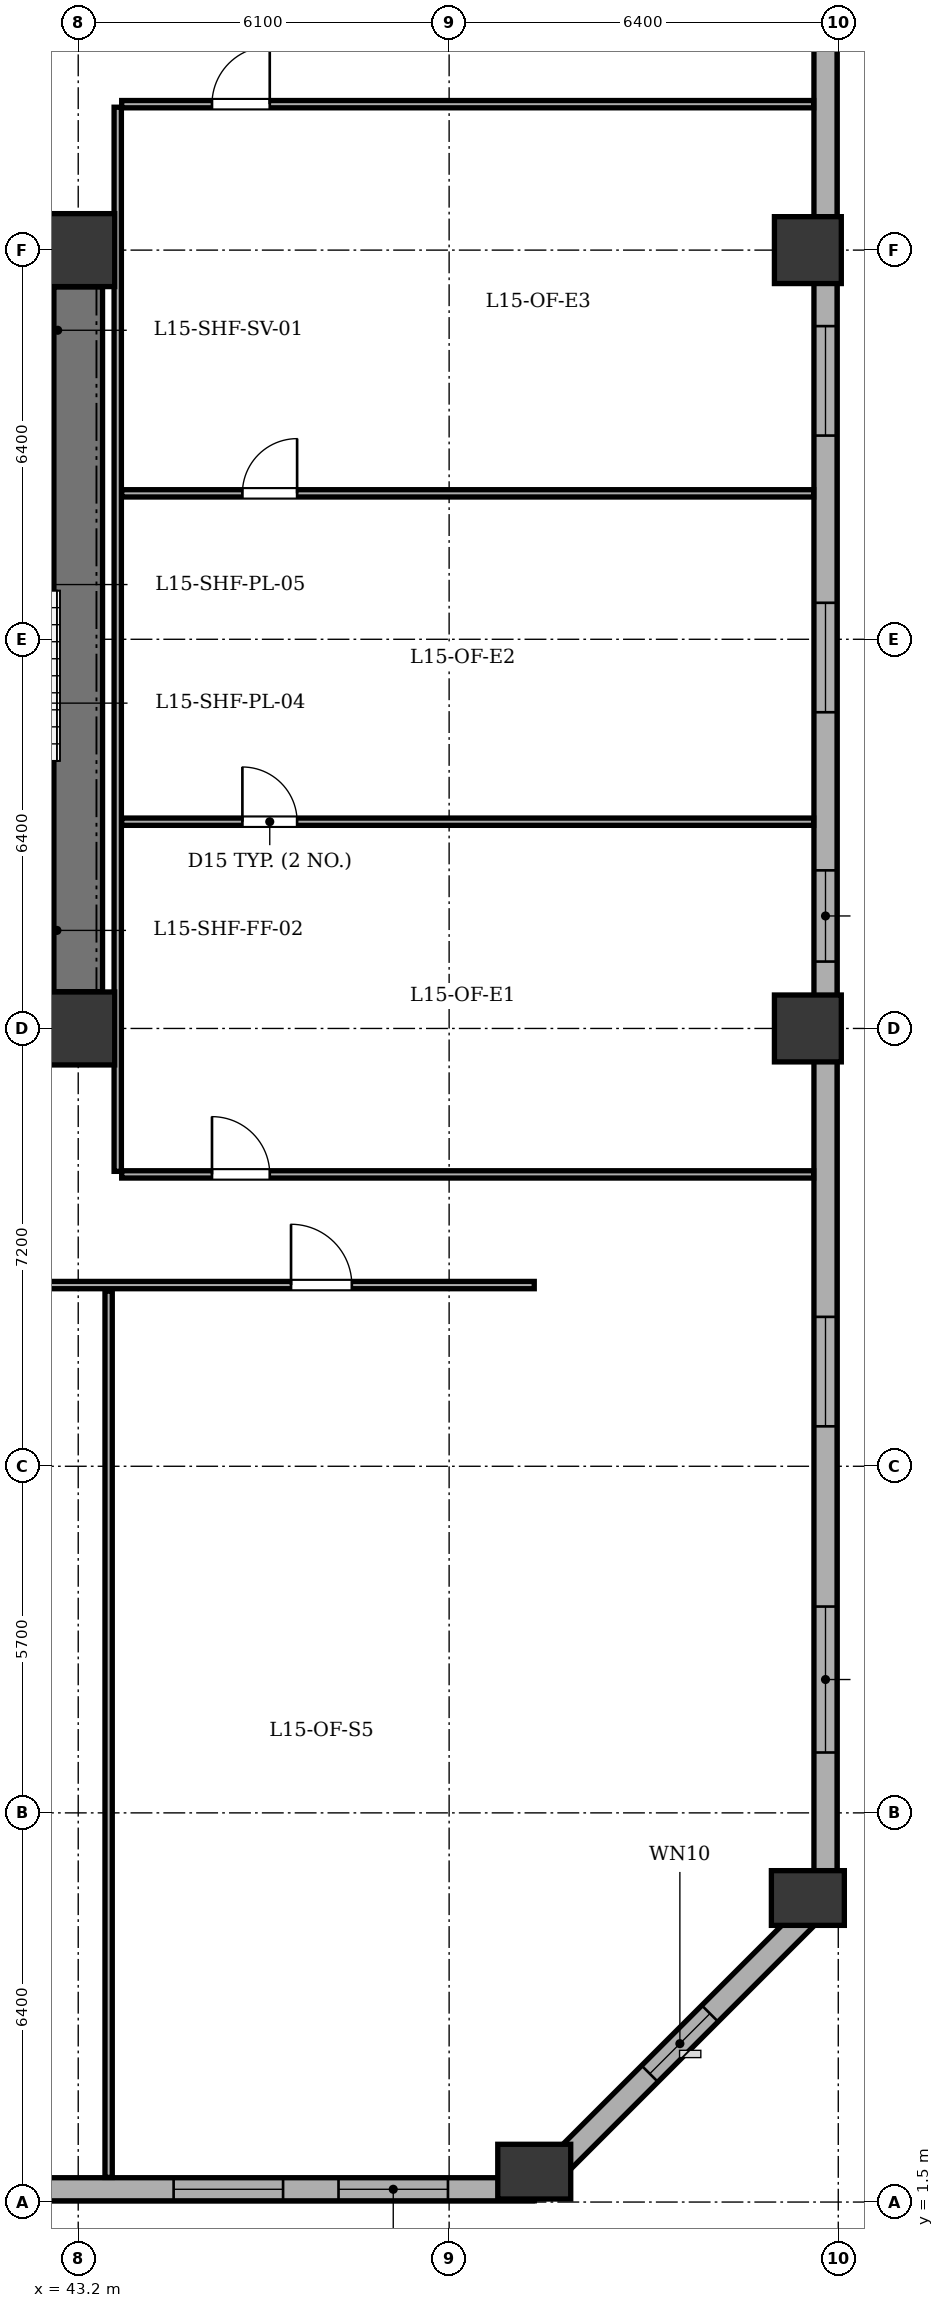
"""IFC4 building model, lengths in metres.
Left out: names, types, materials, properties, quantities, classifications, styles, units other than length and angle.
Written with IfcOpenShell. Run it as: python <this file> out.ifc"""

import sys

from ifc_helpers import new_model, si_unit, direction, frame, frame_2d, origin, origin_2d, place, context, subcontext, project, spatial, rectangle, extrude, element, fill, save


model = new_model("IFC4")
c1 = context("Model", 3, precision=1e-05, world=origin(), true_north=direction((0.0, 1.0)))
c2 = subcontext(c1, "Body", "Model", "MODEL_VIEW")
j1 = project(units=[si_unit("LENGTHUNIT", "METRE"), si_unit("PLANEANGLEUNIT", "RADIAN")], contexts=[c1])
p1 = place(None, origin())
s1 = spatial("IfcSite", under=j1, at=p1, CompositionType="ELEMENT")
p2 = place(p1, origin())
s2 = spatial("IfcBuilding", under=s1, at=p2, CompositionType="ELEMENT")
p3 = place(p2, frame((0.0, 0.0, 63.3)))
s3 = spatial("IfcBuildingStorey", under=s2, at=p3, CompositionType="ELEMENT", Elevation=63.3)
for number, where, z_axis, x_axis in (
    (1, (43.2, 20.8, 0.0), (0.0, 0.0, 1.0), (1.0, 0.0, 0.0)),
    (2, (43.2, 33.6, 0.0), (0.0, 0.0, 1.0), (1.0, 0.0, 0.0)),
):
    element("IfcColumn", number, at=place(p3, frame(where, z_axis=z_axis, x_axis=x_axis)), inside=s3, PredefinedType="COLUMN", context=c2, shape_type="SweptSolid", body=[
        extrude(rectangle(XDim=1.2, YDim=1.2, at=origin_2d()), origin(), (0.0, 0.0, 1.0), 3.9),
    ])
for number, where, z_axis, x_axis in (
    (3, (50.7, 2.0, 0.0), (0.0, 0.0, 1.0), (1.0, 0.0, 0.0)),
    (4, (55.2, 6.5, 0.0), (0.0, 0.0, 1.0), (1.0, 0.0, 0.0)),
):
    element("IfcColumn", number, at=place(p3, frame(where, z_axis=z_axis, x_axis=x_axis)), inside=s3, PredefinedType="COLUMN", context=c2, shape_type="SweptSolid", body=[
        extrude(rectangle(XDim=0.9, YDim=1.2, at=origin_2d()), origin(), (0.0, 0.0, 1.0), 3.9),
    ])
for number, where, z_axis, x_axis in (
    (5, (55.2, 20.8, 0.0), (0.0, 0.0, 1.0), (1.0, 0.0, 0.0)),
    (6, (55.2, 33.6, 0.0), (0.0, 0.0, 1.0), (1.0, 0.0, 0.0)),
):
    element("IfcColumn", number, at=place(p3, frame(where, z_axis=z_axis, x_axis=x_axis)), inside=s3, PredefinedType="COLUMN", context=c2, shape_type="SweptSolid", body=[
        extrude(rectangle(XDim=1.1, YDim=1.1, at=origin_2d()), origin(), (0.0, 0.0, 1.0), 3.9),
    ])
p4 = place(p3, frame((50.7, 1.71, 0.0), z_axis=(0.0, 0.0, 1.0), x_axis=(-1.0, 0.0, 0.0)))
e7 = element("IfcWall", 7, at=p4, inside=s3, PredefinedType="STANDARD", context=c2, shape_type="SweptSolid", body=[
    extrude(rectangle(XDim=35.0, YDim=0.38, at=frame_2d((17.5, 0.0))), origin(), (0.0, 0.0, 1.0), 3.135),
])
p5 = place(p4, frame((26.0, 0.0, 0.0)))
e8 = element("IfcOpeningElement", 8, at=p5, cuts=e7, PredefinedType="OPENING", context=c2, shape_type="SweptSolid", body=[
    extrude(rectangle(XDim=1.0, YDim=2.02, at=frame_2d((0.5, 1.01))), frame((0.0, 0.2, 0.0), z_axis=(0.0, -1.0, 0.0), x_axis=(1.0, 0.0, 0.0)), (0.0, 0.0, 1.0), 0.4),
])
p6 = place(p4, frame((1.419, 0.0, 0.8)))
e9 = element("IfcOpeningElement", 9, at=p6, cuts=e7, PredefinedType="OPENING", context=c2, shape_type="SweptSolid", body=[
    extrude(rectangle(XDim=1.8, YDim=1.9, at=frame_2d((0.9, 0.95))), frame((0.0, 0.2, 0.0), z_axis=(0.0, -1.0, 0.0), x_axis=(1.0, 0.0, 0.0)), (0.0, 0.0, 1.0), 0.4),
])
p7 = place(p4, frame((4.131, 0.0, 0.8)))
e10 = element("IfcOpeningElement", 10, at=p7, cuts=e7, PredefinedType="OPENING", context=c2, shape_type="SweptSolid", body=[
    extrude(rectangle(XDim=1.8, YDim=1.9, at=frame_2d((0.9, 0.95))), frame((0.0, 0.2, 0.0), z_axis=(0.0, -1.0, 0.0), x_axis=(1.0, 0.0, 0.0)), (0.0, 0.0, 1.0), 0.4),
])
p8 = place(p4, frame((8.16, 0.0, 0.8)))
e11 = element("IfcOpeningElement", 11, at=p8, cuts=e7, PredefinedType="OPENING", context=c2, shape_type="SweptSolid", body=[
    extrude(rectangle(XDim=1.8, YDim=1.9, at=frame_2d((0.9, 0.95))), frame((0.0, 0.2, 0.0), z_axis=(0.0, -1.0, 0.0), x_axis=(1.0, 0.0, 0.0)), (0.0, 0.0, 1.0), 0.4),
])
p9 = place(p4, frame((11.04, 0.0, 0.8)))
e12 = element("IfcOpeningElement", 12, at=p9, cuts=e7, PredefinedType="OPENING", context=c2, shape_type="SweptSolid", body=[
    extrude(rectangle(XDim=1.8, YDim=1.9, at=frame_2d((0.9, 0.95))), frame((0.0, 0.2, 0.0), z_axis=(0.0, -1.0, 0.0), x_axis=(1.0, 0.0, 0.0)), (0.0, 0.0, 1.0), 0.4),
])
p10 = place(p4, frame((17.675, 0.0, 0.8)))
e13 = element("IfcOpeningElement", 13, at=p10, cuts=e7, PredefinedType="OPENING", context=c2, shape_type="SweptSolid", body=[
    extrude(rectangle(XDim=1.8, YDim=1.9, at=frame_2d((0.9, 0.95))), frame((0.0, 0.2, 0.0), z_axis=(0.0, -1.0, 0.0), x_axis=(1.0, 0.0, 0.0)), (0.0, 0.0, 1.0), 0.4),
])
p11 = place(p4, frame((31.525, 0.0, 0.8)))
e14 = element("IfcOpeningElement", 14, at=p11, cuts=e7, PredefinedType="OPENING", context=c2, shape_type="SweptSolid", body=[
    extrude(rectangle(XDim=1.8, YDim=1.9, at=frame_2d((0.9, 0.95))), frame((0.0, 0.2, 0.0), z_axis=(0.0, -1.0, 0.0), x_axis=(1.0, 0.0, 0.0)), (0.0, 0.0, 1.0), 0.4),
])
p12 = place(p3, frame((55.49, 41.5, 0.0), z_axis=(0.0, 0.0, 1.0), x_axis=(0.0, -1.0, 0.0)))
e15 = element("IfcWall", 15, at=p12, inside=s3, PredefinedType="STANDARD", context=c2, shape_type="SweptSolid", body=[
    extrude(rectangle(XDim=35.0, YDim=0.38, at=frame_2d((17.5, 0.0))), origin(), (0.0, 0.0, 1.0), 3.135),
])
p13 = place(p12, frame((2.025, 0.0, 0.8)))
e16 = element("IfcOpeningElement", 16, at=p13, cuts=e15, PredefinedType="OPENING", context=c2, shape_type="SweptSolid", body=[
    extrude(rectangle(XDim=1.8, YDim=1.9, at=frame_2d((0.9, 0.95))), frame((0.0, 0.2, 0.0), z_axis=(0.0, -1.0, 0.0), x_axis=(1.0, 0.0, 0.0)), (0.0, 0.0, 1.0), 0.4),
])
p14 = place(p12, frame((9.15, 0.0, 0.8)))
e17 = element("IfcOpeningElement", 17, at=p14, cuts=e15, PredefinedType="OPENING", context=c2, shape_type="SweptSolid", body=[
    extrude(rectangle(XDim=1.8, YDim=1.9, at=frame_2d((0.9, 0.95))), frame((0.0, 0.2, 0.0), z_axis=(0.0, -1.0, 0.0), x_axis=(1.0, 0.0, 0.0)), (0.0, 0.0, 1.0), 0.4),
])
p15 = place(p12, frame((13.7, 0.0, 0.8)))
e18 = element("IfcOpeningElement", 18, at=p15, cuts=e15, PredefinedType="OPENING", context=c2, shape_type="SweptSolid", body=[
    extrude(rectangle(XDim=1.8, YDim=1.9, at=frame_2d((0.9, 0.95))), frame((0.0, 0.2, 0.0), z_axis=(0.0, -1.0, 0.0), x_axis=(1.0, 0.0, 0.0)), (0.0, 0.0, 1.0), 0.4),
])
p16 = place(p12, frame((18.1, 0.0, 0.8)))
e19 = element("IfcOpeningElement", 19, at=p16, cuts=e15, PredefinedType="OPENING", context=c2, shape_type="SweptSolid", body=[
    extrude(rectangle(XDim=1.5, YDim=1.9, at=frame_2d((0.75, 0.95))), frame((0.0, 0.2, 0.0), z_axis=(0.0, -1.0, 0.0), x_axis=(1.0, 0.0, 0.0)), (0.0, 0.0, 1.0), 0.4),
])
p17 = place(p12, frame((25.443, 0.0, 0.8)))
e20 = element("IfcOpeningElement", 20, at=p17, cuts=e15, PredefinedType="OPENING", context=c2, shape_type="SweptSolid", body=[
    extrude(rectangle(XDim=1.8, YDim=1.9, at=frame_2d((0.9, 0.95))), frame((0.0, 0.2, 0.0), z_axis=(0.0, -1.0, 0.0), x_axis=(1.0, 0.0, 0.0)), (0.0, 0.0, 1.0), 0.4),
])
p18 = place(p12, frame((30.207, 0.0, 0.8)))
e21 = element("IfcOpeningElement", 21, at=p18, cuts=e15, PredefinedType="OPENING", context=c2, shape_type="SweptSolid", body=[
    extrude(rectangle(XDim=2.4, YDim=1.9, at=frame_2d((1.2, 0.95))), frame((0.0, 0.2, 0.0), z_axis=(0.0, -1.0, 0.0), x_axis=(1.0, 0.0, 0.0)), (0.0, 0.0, 1.0), 0.4),
])
p19 = place(p3, frame((55.49, 6.5, 0.0), z_axis=(0.0, 0.0, 1.0), x_axis=(-0.707106781187, -0.707106781187, 0.0)))
e22 = element("IfcWall", 22, at=p19, inside=s3, PredefinedType="STANDARD", context=c2, shape_type="SweptSolid", body=[
    extrude(rectangle(XDim=6.774, YDim=0.38, at=frame_2d((3.387, 0.0))), origin(), (0.0, 0.0, 1.0), 3.135),
])
p20 = place(p19, frame((2.687, 0.0, 0.8)))
e23 = element("IfcOpeningElement", 23, at=p20, cuts=e22, PredefinedType="OPENING", context=c2, shape_type="SweptSolid", body=[
    extrude(rectangle(XDim=1.4, YDim=1.65, at=frame_2d((0.7, 0.825))), frame((0.0, 0.2, 0.0), z_axis=(0.0, -1.0, 0.0), x_axis=(1.0, 0.0, 0.0)), (0.0, 0.0, 1.0), 0.4),
])
p21 = place(p3, frame((43.2, 21.405, 0.0), z_axis=(0.0, 0.0, 1.0), x_axis=(0.0, 1.0, 0.0)))
e24 = element("IfcWall", 24, at=p21, inside=s3, PredefinedType="SHEAR", context=c2, shape_type="SweptSolid", body=[
    extrude(rectangle(XDim=11.59, YDim=0.8, at=frame_2d((5.795, 0.0))), origin(), (0.0, 0.0, 1.0), 3.6),
])
for number, where, z_axis, x_axis in (
    (25, (39.69, 23.57, 0.0), (0.0, 0.0, 1.0), (1.0, 0.0, 0.0)),
    (26, (39.69, 30.83, 0.0), (0.0, 0.0, 1.0), (1.0, 0.0, 0.0)),
):
    element("IfcWall", number, at=place(p3, frame(where, z_axis=z_axis, x_axis=x_axis)), inside=s3, PredefinedType="SHEAR", context=c2, shape_type="SweptSolid", body=[
        extrude(rectangle(XDim=3.1, YDim=0.25, at=frame_2d((1.55, 0.0))), origin(), (0.0, 0.0, 1.0), 3.6),
    ])
p22 = place(p3, frame((15.7, 16.58, 0.0), z_axis=(0.0, 0.0, 1.0), x_axis=(1.0, 0.0, 0.0)))
e27 = element("IfcWall", 27, at=p22, inside=s3, PredefinedType="PARTITIONING", context=c2, shape_type="SweptSolid", body=[
    extrude(rectangle(XDim=35.0, YDim=0.12, at=frame_2d((17.5, 0.0))), origin(), (0.0, 0.0, 1.0), 3.6),
])
p23 = place(p22, frame((2.825, 0.0, 0.0)))
e28 = element("IfcOpeningElement", 28, at=p23, cuts=e27, PredefinedType="OPENING", context=c2, shape_type="SweptSolid", body=[
    extrude(rectangle(XDim=1.0, YDim=2.1, at=frame_2d((0.5, 1.05))), frame((0.0, 0.07, 0.0), z_axis=(0.0, -1.0, 0.0), x_axis=(1.0, 0.0, 0.0)), (0.0, 0.0, 1.0), 0.14),
])
p24 = place(p22, frame((9.65, 0.0, 0.0)))
e29 = element("IfcOpeningElement", 29, at=p24, cuts=e27, PredefinedType="OPENING", context=c2, shape_type="SweptSolid", body=[
    extrude(rectangle(XDim=1.0, YDim=2.1, at=frame_2d((0.5, 1.05))), frame((0.0, 0.07, 0.0), z_axis=(0.0, -1.0, 0.0), x_axis=(1.0, 0.0, 0.0)), (0.0, 0.0, 1.0), 0.14),
])
p25 = place(p22, frame((16.825, 0.0, 0.0)))
e30 = element("IfcOpeningElement", 30, at=p25, cuts=e27, PredefinedType="OPENING", context=c2, shape_type="SweptSolid", body=[
    extrude(rectangle(XDim=1.0, YDim=2.1, at=frame_2d((0.5, 1.05))), frame((0.0, 0.07, 0.0), z_axis=(0.0, -1.0, 0.0), x_axis=(1.0, 0.0, 0.0)), (0.0, 0.0, 1.0), 0.14),
])
p26 = place(p22, frame((24.0, 0.0, 0.0)))
e31 = element("IfcOpeningElement", 31, at=p26, cuts=e27, PredefinedType="OPENING", context=c2, shape_type="SweptSolid", body=[
    extrude(rectangle(XDim=1.0, YDim=2.1, at=frame_2d((0.5, 1.05))), frame((0.0, 0.07, 0.0), z_axis=(0.0, -1.0, 0.0), x_axis=(1.0, 0.0, 0.0)), (0.0, 0.0, 1.0), 0.14),
])
p27 = place(p22, frame((31.0, 0.0, 0.0)))
e32 = element("IfcOpeningElement", 32, at=p27, cuts=e27, PredefinedType="OPENING", context=c2, shape_type="SweptSolid", body=[
    extrude(rectangle(XDim=1.0, YDim=2.1, at=frame_2d((0.5, 1.05))), frame((0.0, 0.07, 0.0), z_axis=(0.0, -1.0, 0.0), x_axis=(1.0, 0.0, 0.0)), (0.0, 0.0, 1.0), 0.14),
])
p28 = place(p3, frame((43.7, 1.905, 0.0), z_axis=(0.0, 0.0, 1.0), x_axis=(0.0, 1.0, 0.0)))
e33 = element("IfcWall", 33, at=p28, inside=s3, PredefinedType="PARTITIONING", context=c2, shape_type="SweptSolid", body=[
    extrude(rectangle(XDim=14.575, YDim=0.12, at=frame_2d((7.288, 0.0))), origin(), (0.0, 0.0, 1.0), 3.6),
])
p29 = place(p3, frame((43.85, 18.45, 0.0), z_axis=(0.0, 0.0, 1.0), x_axis=(0.0, 1.0, 0.0)))
e34 = element("IfcWall", 34, at=p29, inside=s3, PredefinedType="PARTITIONING", context=c2, shape_type="SweptSolid", body=[
    extrude(rectangle(XDim=17.5, YDim=0.12, at=frame_2d((8.75, 0.0))), origin(), (0.0, 0.0, 1.0), 3.6),
])
p30 = place(p3, frame((43.915, 18.4, 0.0), z_axis=(0.0, 0.0, 1.0), x_axis=(1.0, 0.0, 0.0)))
e35 = element("IfcWall", 35, at=p30, inside=s3, PredefinedType="PARTITIONING", context=c2, shape_type="SweptSolid", body=[
    extrude(rectangle(XDim=11.38, YDim=0.12, at=frame_2d((5.69, 0.0))), origin(), (0.0, 0.0, 1.0), 3.6),
])
p31 = place(p30, frame((1.485, 0.0, 0.0)))
e36 = element("IfcOpeningElement", 36, at=p31, cuts=e35, PredefinedType="OPENING", context=c2, shape_type="SweptSolid", body=[
    extrude(rectangle(XDim=0.95, YDim=2.1, at=frame_2d((0.475, 1.05))), frame((0.0, 0.07, 0.0), z_axis=(0.0, -1.0, 0.0), x_axis=(1.0, 0.0, 0.0)), (0.0, 0.0, 1.0), 0.14),
])
p32 = place(p3, frame((43.915, 36.0, 0.0), z_axis=(0.0, 0.0, 1.0), x_axis=(1.0, 0.0, 0.0)))
e37 = element("IfcWall", 37, at=p32, inside=s3, PredefinedType="PARTITIONING", context=c2, shape_type="SweptSolid", body=[
    extrude(rectangle(XDim=11.38, YDim=0.12, at=frame_2d((5.69, 0.0))), origin(), (0.0, 0.0, 1.0), 3.6),
])
p33 = place(p32, frame((1.485, 0.0, 0.0)))
e38 = element("IfcOpeningElement", 38, at=p33, cuts=e37, PredefinedType="OPENING", context=c2, shape_type="SweptSolid", body=[
    extrude(rectangle(XDim=0.95, YDim=2.1, at=frame_2d((0.475, 1.05))), frame((0.0, 0.07, 0.0), z_axis=(0.0, -1.0, 0.0), x_axis=(1.0, 0.0, 0.0)), (0.0, 0.0, 1.0), 0.14),
])
p34 = place(p3, frame((43.915, 24.2, 0.0), z_axis=(0.0, 0.0, 1.0), x_axis=(1.0, 0.0, 0.0)))
e39 = element("IfcWall", 39, at=p34, inside=s3, PredefinedType="PARTITIONING", context=c2, shape_type="SweptSolid", body=[
    extrude(rectangle(XDim=11.38, YDim=0.12, at=frame_2d((5.69, 0.0))), origin(), (0.0, 0.0, 1.0), 3.6),
])
p35 = place(p34, frame((1.985, 0.0, 0.0)))
e40 = element("IfcOpeningElement", 40, at=p35, cuts=e39, PredefinedType="OPENING", context=c2, shape_type="SweptSolid", body=[
    extrude(rectangle(XDim=0.9, YDim=2.05, at=frame_2d((0.45, 1.025))), frame((0.0, 0.07, 0.0), z_axis=(0.0, -1.0, 0.0), x_axis=(1.0, 0.0, 0.0)), (0.0, 0.0, 1.0), 0.14),
])
p36 = place(p3, frame((43.915, 29.6, 0.0), z_axis=(0.0, 0.0, 1.0), x_axis=(1.0, 0.0, 0.0)))
e41 = element("IfcWall", 41, at=p36, inside=s3, PredefinedType="PARTITIONING", context=c2, shape_type="SweptSolid", body=[
    extrude(rectangle(XDim=11.38, YDim=0.12, at=frame_2d((5.69, 0.0))), origin(), (0.0, 0.0, 1.0), 3.6),
])
p37 = place(p36, frame((1.985, 0.0, 0.0)))
e42 = element("IfcOpeningElement", 42, at=p37, cuts=e41, PredefinedType="OPENING", context=c2, shape_type="SweptSolid", body=[
    extrude(rectangle(XDim=0.9, YDim=2.05, at=frame_2d((0.45, 1.025))), frame((0.0, 0.07, 0.0), z_axis=(0.0, -1.0, 0.0), x_axis=(1.0, 0.0, 0.0)), (0.0, 0.0, 1.0), 0.14),
])
p38 = place(p6, origin())
e43 = element("IfcWindow", 43, at=p38, inside=s3, PartitioningType="SINGLE_PANEL", PredefinedType="WINDOW", context=c2, shape_type="SweptSolid", body=[
    extrude(rectangle(XDim=1.8, YDim=1.9, at=frame_2d((0.9, 0.95))), frame((0.0, -0.01, 0.0), z_axis=(0.0, -1.0, 0.0), x_axis=(1.0, 0.0, 0.0)), (0.0, 0.0, 1.0), 0.06),
])
fill(e9, e43)
p39 = place(p7, origin())
e44 = element("IfcWindow", 44, at=p39, inside=s3, PartitioningType="SINGLE_PANEL", PredefinedType="WINDOW", context=c2, shape_type="SweptSolid", body=[
    extrude(rectangle(XDim=1.8, YDim=1.9, at=frame_2d((0.9, 0.95))), frame((0.0, -0.01, 0.0), z_axis=(0.0, -1.0, 0.0), x_axis=(1.0, 0.0, 0.0)), (0.0, 0.0, 1.0), 0.06),
])
fill(e10, e44)
p40 = place(p14, origin())
e45 = element("IfcWindow", 45, at=p40, inside=s3, PartitioningType="SINGLE_PANEL", PredefinedType="WINDOW", context=c2, shape_type="SweptSolid", body=[
    extrude(rectangle(XDim=1.8, YDim=1.9, at=frame_2d((0.9, 0.95))), frame((0.0, -0.01, 0.0), z_axis=(0.0, -1.0, 0.0), x_axis=(1.0, 0.0, 0.0)), (0.0, 0.0, 1.0), 0.06),
])
fill(e17, e45)
p41 = place(p15, origin())
e46 = element("IfcWindow", 46, at=p41, inside=s3, PartitioningType="SINGLE_PANEL", PredefinedType="WINDOW", context=c2, shape_type="SweptSolid", body=[
    extrude(rectangle(XDim=1.8, YDim=1.9, at=frame_2d((0.9, 0.95))), frame((0.0, -0.01, 0.0), z_axis=(0.0, -1.0, 0.0), x_axis=(1.0, 0.0, 0.0)), (0.0, 0.0, 1.0), 0.06),
])
fill(e18, e46)
p42 = place(p16, origin())
e47 = element("IfcWindow", 47, at=p42, inside=s3, PartitioningType="SINGLE_PANEL", PredefinedType="WINDOW", context=c2, shape_type="SweptSolid", body=[
    extrude(rectangle(XDim=1.5, YDim=1.9, at=frame_2d((0.75, 0.95))), frame((0.0, -0.01, 0.0), z_axis=(0.0, -1.0, 0.0), x_axis=(1.0, 0.0, 0.0)), (0.0, 0.0, 1.0), 0.06),
])
fill(e19, e47)
p43 = place(p17, origin())
e48 = element("IfcWindow", 48, at=p43, inside=s3, PartitioningType="SINGLE_PANEL", PredefinedType="WINDOW", context=c2, shape_type="SweptSolid", body=[
    extrude(rectangle(XDim=1.8, YDim=1.9, at=frame_2d((0.9, 0.95))), frame((0.0, -0.01, 0.0), z_axis=(0.0, -1.0, 0.0), x_axis=(1.0, 0.0, 0.0)), (0.0, 0.0, 1.0), 0.06),
])
fill(e20, e48)
p44 = place(p18, origin())
e49 = element("IfcWindow", 49, at=p44, inside=s3, PartitioningType="SINGLE_PANEL", PredefinedType="WINDOW", context=c2, shape_type="SweptSolid", body=[
    extrude(rectangle(XDim=2.4, YDim=1.9, at=frame_2d((1.2, 0.95))), frame((0.0, -0.01, 0.0), z_axis=(0.0, -1.0, 0.0), x_axis=(1.0, 0.0, 0.0)), (0.0, 0.0, 1.0), 0.06),
])
fill(e21, e49)
p45 = place(p20, origin())
e50 = element("IfcWindow", 50, at=p45, inside=s3, PartitioningType="SINGLE_PANEL", PredefinedType="WINDOW", context=c2, shape_type="SweptSolid", body=[
    extrude(rectangle(XDim=1.4, YDim=1.65, at=frame_2d((0.7, 0.825))), frame((0.0, -0.01, 0.0), z_axis=(0.0, -1.0, 0.0), x_axis=(1.0, 0.0, 0.0)), (0.0, 0.0, 1.0), 0.06),
])
fill(e23, e50)
p46 = place(p27, origin())
e51 = element("IfcDoor", 51, at=p46, inside=s3, OperationType="SINGLE_SWING_LEFT", PredefinedType="DOOR", context=c2, shape_type="SweptSolid", body=[
    extrude(rectangle(XDim=1.0, YDim=2.1, at=frame_2d((0.5, 1.05))), frame((0.0, 0.025, 0.0), z_axis=(0.0, -1.0, 0.0), x_axis=(1.0, 0.0, 0.0)), (0.0, 0.0, 1.0), 0.05),
])
fill(e32, e51)
p47 = place(p35, origin())
e52 = element("IfcDoor", 52, at=p47, inside=s3, OperationType="SINGLE_SWING_LEFT", PredefinedType="DOOR", context=c2, shape_type="SweptSolid", body=[
    extrude(rectangle(XDim=0.9, YDim=2.05, at=frame_2d((0.45, 1.025))), frame((0.0, 0.025, 0.0), z_axis=(0.0, -1.0, 0.0), x_axis=(1.0, 0.0, 0.0)), (0.0, 0.0, 1.0), 0.05),
])
fill(e40, e52)
p48 = place(p37, origin())
e53 = element("IfcDoor", 53, at=p48, inside=s3, OperationType="SINGLE_SWING_RIGHT", PredefinedType="DOOR", context=c2, shape_type="SweptSolid", body=[
    extrude(rectangle(XDim=0.9, YDim=2.05, at=frame_2d((0.45, 1.025))), frame((0.0, 0.025, 0.0), z_axis=(0.0, -1.0, 0.0), x_axis=(1.0, 0.0, 0.0)), (0.0, 0.0, 1.0), 0.05),
])
fill(e42, e53)
p49 = place(p31, origin())
e54 = element("IfcDoor", 54, at=p49, inside=s3, OperationType="SINGLE_SWING_LEFT", PredefinedType="DOOR", context=c2, shape_type="SweptSolid", body=[
    extrude(rectangle(XDim=0.95, YDim=2.1, at=frame_2d((0.475, 1.05))), frame((0.0, 0.025, 0.0), z_axis=(0.0, -1.0, 0.0), x_axis=(1.0, 0.0, 0.0)), (0.0, 0.0, 1.0), 0.05),
])
fill(e36, e54)
p50 = place(p33, origin())
e55 = element("IfcDoor", 55, at=p50, inside=s3, OperationType="SINGLE_SWING_RIGHT", PredefinedType="DOOR", context=c2, shape_type="SweptSolid", body=[
    extrude(rectangle(XDim=0.95, YDim=2.1, at=frame_2d((0.475, 1.05))), frame((0.0, 0.025, 0.0), z_axis=(0.0, -1.0, 0.0), x_axis=(1.0, 0.0, 0.0)), (0.0, 0.0, 1.0), 0.05),
])
fill(e38, e55)
save(model, sys.argv[1])
